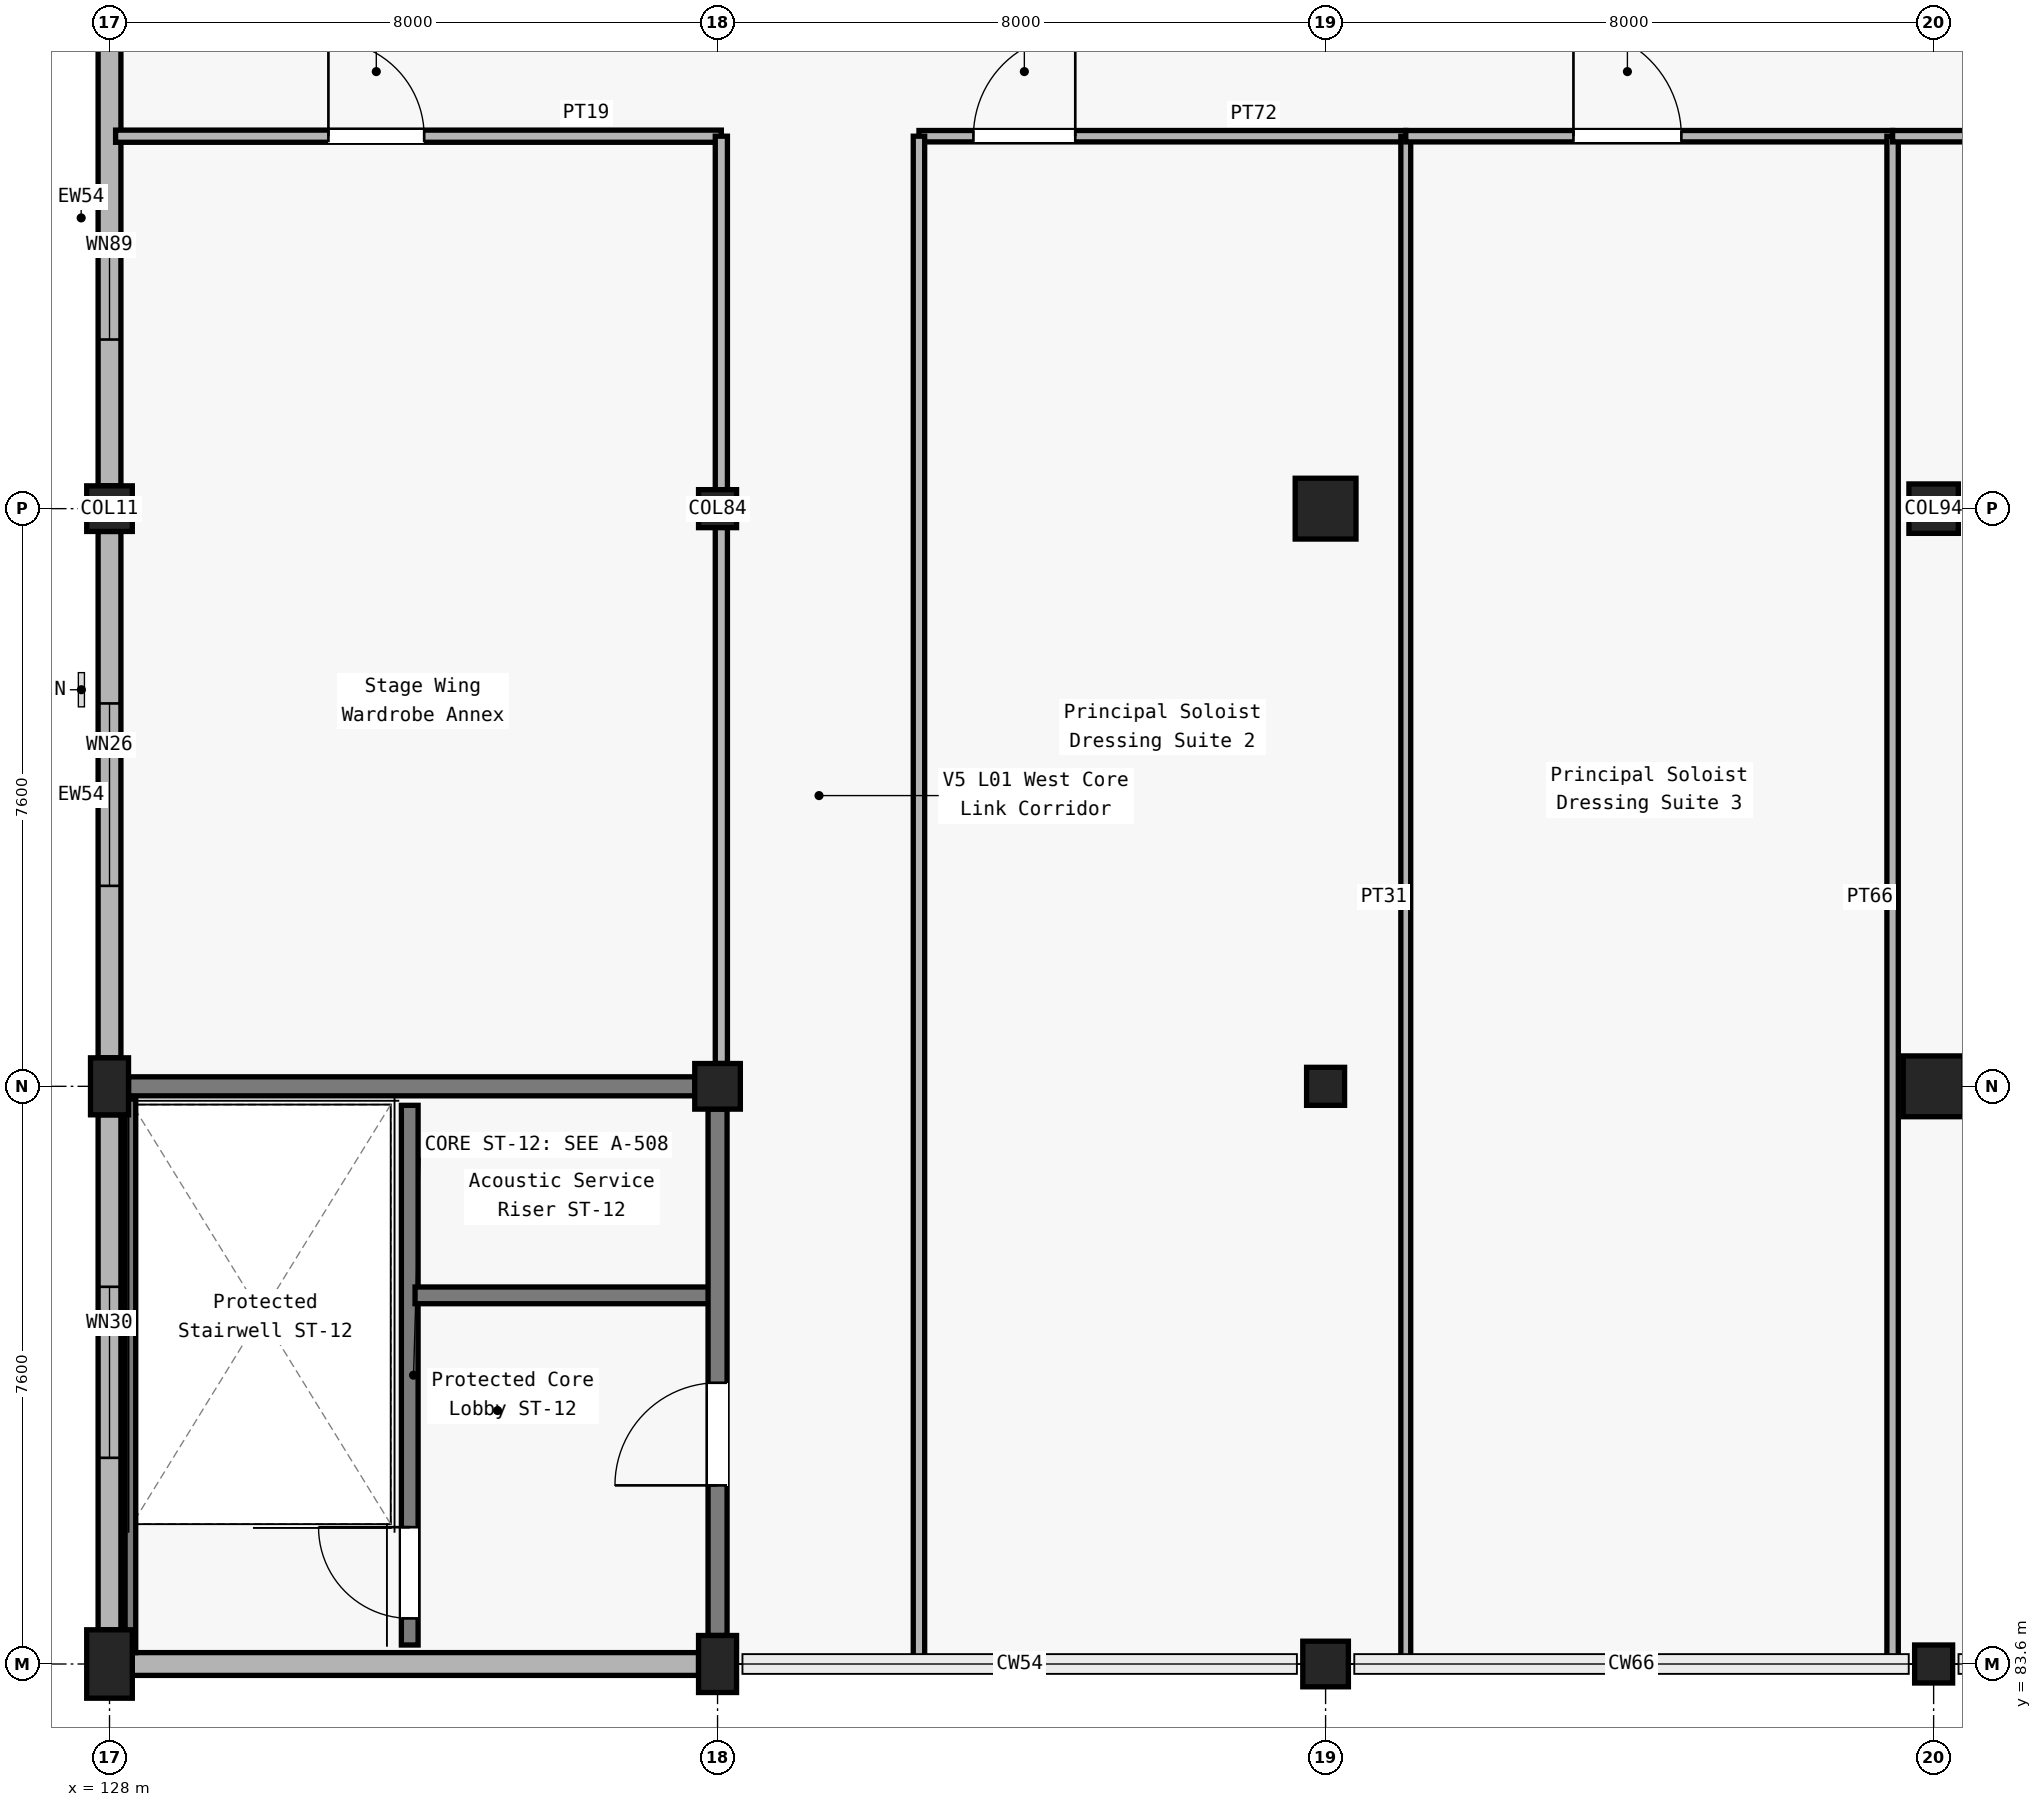
"""IFC4 building model, lengths in metres.
Left out: names, types, materials, properties, quantities, classifications, styles, units other than length and angle.
Written with IfcOpenShell. Run it as: python <this file> out.ifc"""

import sys

from ifc_helpers import new_model, si_unit, direction, frame, frame_2d, origin, origin_2d, place, context, subcontext, project, spatial, rectangle, circle, extrude, element, fill, save


model = new_model("IFC4")
c1 = context("Model", 3, precision=1e-05, world=origin(), true_north=direction((0.0, 1.0)))
c2 = subcontext(c1, "Body", "Model", "MODEL_VIEW")
j1 = project(units=[si_unit("LENGTHUNIT", "METRE"), si_unit("PLANEANGLEUNIT", "RADIAN")], contexts=[c1])
p1 = place(None, origin())
s1 = spatial("IfcSite", under=j1, at=p1, CompositionType="ELEMENT")
p2 = place(p1, origin())
s2 = spatial("IfcBuilding", under=s1, at=p2, CompositionType="ELEMENT")
p3 = place(p2, frame((0.0, 0.0, 5.4)))
s3 = spatial("IfcBuildingStorey", under=s2, at=p3, CompositionType="ELEMENT", Elevation=5.4)
p4 = place(p3, frame((128.0, 83.6, 0.0), z_axis=(0.0, 0.0, 1.0), x_axis=(1.0, 0.0, 0.0)))
e1 = element("IfcColumn", 1, at=p4, inside=s3, PredefinedType="COLUMN", context=c2, shape_type="SweptSolid", body=[
    extrude(rectangle(XDim=0.6, YDim=0.9, at=origin_2d()), origin(), (0.0, 0.0, 1.0), 4.8),
])
p5 = place(p3, frame((128.0, 91.2, 0.0), z_axis=(0.0, 0.0, 1.0), x_axis=(1.0, 0.0, 0.0)))
e2 = element("IfcColumn", 2, at=p5, inside=s3, PredefinedType="COLUMN", context=c2, shape_type="SweptSolid", body=[
    extrude(rectangle(XDim=0.5, YDim=0.75, at=origin_2d()), origin(), (0.0, 0.0, 1.0), 4.8),
])
p6 = place(p3, frame((128.0, 98.8, 0.0), z_axis=(0.0, 0.0, 1.0), x_axis=(1.0, 0.0, 0.0)))
e3 = element("IfcColumn", 3, at=p6, inside=s3, PredefinedType="COLUMN", context=c2, shape_type="SweptSolid", body=[
    extrude(rectangle(XDim=0.6, YDim=0.6, at=origin_2d()), origin(), (0.0, 0.0, 1.0), 4.8),
])
p7 = place(p3, frame((136.0, 83.6, 0.0), z_axis=(0.0, 0.0, 1.0), x_axis=(1.0, 0.0, 0.0)))
e4 = element("IfcColumn", 4, at=p7, inside=s3, PredefinedType="COLUMN", context=c2, shape_type="SweptSolid", body=[
    extrude(rectangle(XDim=0.5, YDim=0.75, at=origin_2d()), origin(), (0.0, 0.0, 1.0), 4.8),
])
p8 = place(p3, frame((136.0, 91.2, 0.0), z_axis=(0.0, 0.0, 1.0), x_axis=(1.0, 0.0, 0.0)))
e5 = element("IfcColumn", 5, at=p8, inside=s3, PredefinedType="COLUMN", context=c2, shape_type="SweptSolid", body=[
    extrude(rectangle(XDim=0.6, YDim=0.6, at=origin_2d()), origin(), (0.0, 0.0, 1.0), 4.8),
])
p9 = place(p3, frame((136.0, 98.8, 0.0), z_axis=(0.0, 0.0, 1.0), x_axis=(1.0, 0.0, 0.0)))
e6 = element("IfcColumn", 6, at=p9, inside=s3, PredefinedType="COLUMN", context=c2, shape_type="SweptSolid", body=[
    extrude(rectangle(XDim=0.5, YDim=0.5, at=origin_2d()), origin(), (0.0, 0.0, 1.0), 4.8),
])
p10 = place(p3, frame((144.0, 83.6, 0.0), z_axis=(0.0, 0.0, 1.0), x_axis=(1.0, 0.0, 0.0)))
e7 = element("IfcColumn", 7, at=p10, inside=s3, PredefinedType="COLUMN", context=c2, shape_type="SweptSolid", body=[
    extrude(rectangle(XDim=0.6, YDim=0.6, at=origin_2d()), origin(), (0.0, 0.0, 1.0), 4.8),
])
p11 = place(p3, frame((144.0, 91.2, 0.0), z_axis=(0.0, 0.0, 1.0), x_axis=(1.0, 0.0, 0.0)))
e8 = element("IfcColumn", 8, at=p11, inside=s3, PredefinedType="COLUMN", context=c2, shape_type="SweptSolid", body=[
    extrude(rectangle(XDim=0.5, YDim=0.5, at=origin_2d()), origin(), (0.0, 0.0, 1.0), 4.8),
])
p12 = place(p3, frame((144.0, 98.8, 0.0), z_axis=(0.0, 0.0, 1.0), x_axis=(1.0, 0.0, 0.0)))
e9 = element("IfcColumn", 9, at=p12, inside=s3, PredefinedType="COLUMN", context=c2, shape_type="SweptSolid", body=[
    extrude(circle(Radius=0.4, at=origin_2d()), origin(), (0.0, 0.0, 1.0), 4.8),
])
p13 = place(p3, frame((152.0, 83.6, 0.0), z_axis=(0.0, 0.0, 1.0), x_axis=(1.0, 0.0, 0.0)))
e10 = element("IfcColumn", 10, at=p13, inside=s3, PredefinedType="COLUMN", context=c2, shape_type="SweptSolid", body=[
    extrude(rectangle(XDim=0.5, YDim=0.5, at=origin_2d()), origin(), (0.0, 0.0, 1.0), 4.8),
])
p14 = place(p3, frame((152.0, 91.2, 0.0), z_axis=(0.0, 0.0, 1.0), x_axis=(1.0, 0.0, 0.0)))
e11 = element("IfcColumn", 11, at=p14, inside=s3, PredefinedType="COLUMN", context=c2, shape_type="SweptSolid", body=[
    extrude(circle(Radius=0.4, at=origin_2d()), origin(), (0.0, 0.0, 1.0), 4.8),
])
p15 = place(p3, frame((152.0, 98.8, 0.0), z_axis=(0.0, 0.0, 1.0), x_axis=(1.0, 0.0, 0.0)))
e12 = element("IfcColumn", 12, at=p15, inside=s3, PredefinedType="COLUMN", context=c2, shape_type="SweptSolid", body=[
    extrude(circle(Radius=0.325, at=origin_2d()), origin(), (0.0, 0.0, 1.0), 4.8),
])
p16 = place(p3, frame((135.75, 83.6, 0.0), z_axis=(0.0, 0.0, 1.0), x_axis=(-1.0, 0.0, 0.0)))
e13 = element("IfcWall", 13, at=p16, inside=s3, PredefinedType="SOLIDWALL", context=c2, shape_type="SweptSolid", body=[
    extrude(rectangle(XDim=7.45, YDim=0.3, at=frame_2d((3.725, 0.0))), origin(), (0.0, 0.0, 1.0), 4.2),
])
p17 = place(p3, frame((128.0, 84.05, 0.0), z_axis=(0.0, 0.0, 1.0), x_axis=(0.0, 1.0, 0.0)))
e14 = element("IfcWall", 14, at=p17, inside=s3, PredefinedType="SOLIDWALL", context=c2, shape_type="SweptSolid", body=[
    extrude(rectangle(XDim=6.775, YDim=0.3, at=frame_2d((3.387, 0.0))), origin(), (0.0, 0.0, 1.0), 4.51),
])
p18 = place(p17, frame((2.262, 0.0, 0.95)))
e15 = element("IfcOpeningElement", 15, at=p18, cuts=e14, PredefinedType="OPENING", context=c2, shape_type="SweptSolid", body=[
    extrude(rectangle(XDim=2.25, YDim=1.5, at=frame_2d((1.125, 0.75))), frame((0.0, 0.16, 0.0), z_axis=(0.0, -1.0, 0.0), x_axis=(1.0, 0.0, 0.0)), (0.0, 0.0, 1.0), 0.32),
])
p19 = place(p3, frame((128.0, 91.575, 0.0), z_axis=(0.0, 0.0, 1.0), x_axis=(0.0, 1.0, 0.0)))
e16 = element("IfcWall", 16, at=p19, inside=s3, PredefinedType="SOLIDWALL", context=c2, shape_type="SweptSolid", body=[
    extrude(rectangle(XDim=6.925, YDim=0.3, at=frame_2d((3.462, 0.0))), origin(), (0.0, 0.0, 1.0), 3.85),
])
p20 = place(p19, frame((2.262, 0.0, 0.95)))
e17 = element("IfcOpeningElement", 17, at=p20, cuts=e16, PredefinedType="OPENING", context=c2, shape_type="SweptSolid", body=[
    extrude(rectangle(XDim=2.4, YDim=1.5, at=frame_2d((1.2, 0.75))), frame((0.0, 0.16, 0.0), z_axis=(0.0, -1.0, 0.0), x_axis=(1.0, 0.0, 0.0)), (0.0, 0.0, 1.0), 0.32),
])
p21 = place(p3, frame((128.0, 99.1, 0.0), z_axis=(0.0, 0.0, 1.0), x_axis=(0.0, 1.0, 0.0)))
e18 = element("IfcWall", 18, at=p21, inside=s3, PredefinedType="SOLIDWALL", context=c2, shape_type="SweptSolid", body=[
    extrude(rectangle(XDim=7.05, YDim=0.3, at=frame_2d((3.525, 0.0))), origin(), (0.0, 0.0, 1.0), 3.85),
])
p22 = place(p21, frame((1.925, 0.0, 0.95)))
e19 = element("IfcOpeningElement", 19, at=p22, cuts=e18, PredefinedType="OPENING", context=c2, shape_type="SweptSolid", body=[
    extrude(rectangle(XDim=1.2, YDim=1.65, at=frame_2d((0.6, 0.825))), frame((0.0, 0.16, 0.0), z_axis=(0.0, -1.0, 0.0), x_axis=(1.0, 0.0, 0.0)), (0.0, 0.0, 1.0), 0.32),
])
p23 = place(p3, frame((128.25, 91.2, 0.0), z_axis=(0.0, 0.0, 1.0), x_axis=(1.0, 0.0, 0.0)))
e20 = element("IfcWall", 20, at=p23, inside=s3, PredefinedType="SOLIDWALL", context=c2, shape_type="SweptSolid", body=[
    extrude(rectangle(XDim=7.45, YDim=0.25, at=frame_2d((3.725, 0.0))), origin(), (0.0, 0.0, 1.0), 3.76),
])
p24 = place(p3, frame((131.95, 83.85, 0.0), z_axis=(0.0, 0.0, 1.0), x_axis=(0.0, 1.0, 0.0)))
e21 = element("IfcWall", 21, at=p24, inside=s3, PredefinedType="SOLIDWALL", context=c2, shape_type="SweptSolid", body=[
    extrude(rectangle(XDim=7.1, YDim=0.22, at=frame_2d((3.55, 0.0))), origin(), (0.0, 0.0, 1.0), 4.51),
])
p25 = place(p24, frame((0.35, 0.0, 0.0)))
e22 = element("IfcOpeningElement", 22, at=p25, cuts=e21, PredefinedType="OPENING", context=c2, shape_type="SweptSolid", body=[
    extrude(rectangle(XDim=1.2, YDim=2.15, at=frame_2d((0.6, 1.075))), frame((0.0, 0.12, 0.0), z_axis=(0.0, -1.0, 0.0), x_axis=(1.0, 0.0, 0.0)), (0.0, 0.0, 1.0), 0.24),
])
p26 = place(p3, frame((132.02, 88.45, 0.0), z_axis=(0.0, 0.0, 1.0), x_axis=(1.0, 0.0, 0.0)))
e23 = element("IfcWall", 23, at=p26, inside=s3, PredefinedType="SOLIDWALL", context=c2, shape_type="SweptSolid", body=[
    extrude(rectangle(XDim=3.93, YDim=0.22, at=frame_2d((1.965, 0.0))), origin(), (0.0, 0.0, 1.0), 4.51),
])
p27 = place(p3, frame((136.0, 83.975, 0.0), z_axis=(0.0, 0.0, 1.0), x_axis=(0.0, 1.0, 0.0)))
e24 = element("IfcWall", 24, at=p27, inside=s3, PredefinedType="SOLIDWALL", context=c2, shape_type="SweptSolid", body=[
    extrude(rectangle(XDim=6.925, YDim=0.25, at=frame_2d((3.462, 0.0))), origin(), (0.0, 0.0, 1.0), 3.76),
])
p28 = place(p27, frame((1.975, 0.0, 0.0)))
e25 = element("IfcOpeningElement", 25, at=p28, cuts=e24, PredefinedType="OPENING", context=c2, shape_type="SweptSolid", body=[
    extrude(rectangle(XDim=1.35, YDim=2.2, at=frame_2d((0.675, 1.1))), frame((0.0, 0.135, 0.0), z_axis=(0.0, -1.0, 0.0), x_axis=(1.0, 0.0, 0.0)), (0.0, 0.0, 1.0), 0.27),
])
p29 = place(p3, frame((128.08, 103.7, 0.0), z_axis=(0.0, 0.0, 1.0), x_axis=(1.0, 0.0, 0.0)))
e26 = element("IfcWall", 26, at=p29, inside=s3, PredefinedType="PARTITIONING", context=c2, shape_type="SweptSolid", body=[
    extrude(rectangle(XDim=7.97, YDim=0.16, at=frame_2d((3.985, 0.0))), origin(), (0.0, 0.0, 1.0), 3.735),
])
p30 = place(p29, frame((2.8, 0.0, 0.0)))
e27 = element("IfcOpeningElement", 27, at=p30, cuts=e26, PredefinedType="OPENING", context=c2, shape_type="SweptSolid", body=[
    extrude(rectangle(XDim=1.26, YDim=2.2, at=frame_2d((0.63, 1.1))), frame((0.0, 0.09, 0.0), z_axis=(0.0, -1.0, 0.0), x_axis=(1.0, 0.0, 0.0)), (0.0, 0.0, 1.0), 0.18),
])
p31 = place(p3, frame((136.05, 91.5, 0.0), z_axis=(0.0, 0.0, 1.0), x_axis=(0.0, 1.0, 0.0)))
e28 = element("IfcWall", 28, at=p31, inside=s3, PredefinedType="PARTITIONING", context=c2, shape_type="SweptSolid", body=[
    extrude(rectangle(XDim=12.2, YDim=0.16, at=frame_2d((6.1, 0.0))), origin(), (0.0, 0.0, 1.0), 3.735),
])
p32 = place(p3, frame((138.65, 103.7, 0.0), z_axis=(0.0, 0.0, 1.0), x_axis=(1.0, 0.0, 0.0)))
e29 = element("IfcWall", 29, at=p32, inside=s3, PredefinedType="PARTITIONING", context=c2, shape_type="SweptSolid", body=[
    extrude(rectangle(XDim=6.405, YDim=0.15, at=frame_2d((3.203, 0.0))), origin(), (0.0, 0.0, 1.0), 3.735),
])
p33 = place(p32, frame((0.717, 0.0, 0.0)))
e30 = element("IfcOpeningElement", 30, at=p33, cuts=e29, PredefinedType="OPENING", context=c2, shape_type="SweptSolid", body=[
    extrude(rectangle(XDim=1.34, YDim=2.2, at=frame_2d((0.67, 1.1))), frame((0.0, 0.085, 0.0), z_axis=(0.0, -1.0, 0.0), x_axis=(1.0, 0.0, 0.0)), (0.0, 0.0, 1.0), 0.17),
])
p34 = place(p3, frame((145.055, 83.68, 0.0), z_axis=(0.0, 0.0, 1.0), x_axis=(0.0, 1.0, 0.0)))
e31 = element("IfcWall", 31, at=p34, inside=s3, PredefinedType="PARTITIONING", context=c2, shape_type="SweptSolid", body=[
    extrude(rectangle(XDim=20.02, YDim=0.13, at=frame_2d((10.01, 0.0))), origin(), (0.0, 0.0, 1.0), 3.55),
])
p35 = place(p3, frame((145.055, 103.7, 0.0), z_axis=(0.0, 0.0, 1.0), x_axis=(1.0, 0.0, 0.0)))
e32 = element("IfcWall", 32, at=p35, inside=s3, PredefinedType="PARTITIONING", context=c2, shape_type="SweptSolid", body=[
    extrude(rectangle(XDim=6.405, YDim=0.15, at=frame_2d((3.203, 0.0))), origin(), (0.0, 0.0, 1.0), 3.895),
])
p36 = place(p35, frame((2.206, 0.0, 0.0)))
e33 = element("IfcOpeningElement", 33, at=p36, cuts=e32, PredefinedType="OPENING", context=c2, shape_type="SweptSolid", body=[
    extrude(rectangle(XDim=1.42, YDim=2.2, at=frame_2d((0.71, 1.1))), frame((0.0, 0.085, 0.0), z_axis=(0.0, -1.0, 0.0), x_axis=(1.0, 0.0, 0.0)), (0.0, 0.0, 1.0), 0.17),
])
p37 = place(p3, frame((151.46, 83.68, 0.0), z_axis=(0.0, 0.0, 1.0), x_axis=(0.0, 1.0, 0.0)))
e34 = element("IfcWall", 34, at=p37, inside=s3, PredefinedType="PARTITIONING", context=c2, shape_type="SweptSolid", body=[
    extrude(rectangle(XDim=20.02, YDim=0.15, at=frame_2d((10.01, 0.0))), origin(), (0.0, 0.0, 1.0), 3.55),
])
p38 = place(p3, frame((151.46, 103.7, 0.0), z_axis=(0.0, 0.0, 1.0), x_axis=(1.0, 0.0, 0.0)))
e35 = element("IfcWall", 35, at=p38, inside=s3, PredefinedType="PARTITIONING", context=c2, shape_type="SweptSolid", body=[
    extrude(rectangle(XDim=8.54, YDim=0.15, at=frame_2d((4.27, 0.0))), origin(), (0.0, 0.0, 1.0), 3.685),
])
p39 = place(p38, frame((3.77, 0.0, 0.0)))
e36 = element("IfcOpeningElement", 36, at=p39, cuts=e35, PredefinedType="OPENING", context=c2, shape_type="SweptSolid", body=[
    extrude(rectangle(XDim=0.92, YDim=2.05, at=frame_2d((0.46, 1.025))), frame((0.0, 0.085, 0.0), z_axis=(0.0, -1.0, 0.0), x_axis=(1.0, 0.0, 0.0)), (0.0, 0.0, 1.0), 0.17),
])
p40 = place(p3, frame((138.65, 83.68, 0.0), z_axis=(0.0, 0.0, 1.0), x_axis=(0.0, 1.0, 0.0)))
e37 = element("IfcWall", 37, at=p40, inside=s3, PredefinedType="PARTITIONING", context=c2, shape_type="SweptSolid", body=[
    extrude(rectangle(XDim=20.02, YDim=0.15, at=frame_2d((10.01, 0.0))), origin(), (0.0, 0.0, 1.0), 3.735),
])
p41 = place(p3, frame((128.275, 83.75, 0.0), z_axis=(0.0, 0.0, 1.0), x_axis=(0.0, 1.0, 0.0)))
e38 = element("IfcWall", 38, at=p41, inside=s3, PredefinedType="SOLIDWALL", context=c2, shape_type="SweptSolid", body=[
    extrude(rectangle(XDim=7.3, YDim=0.14, at=frame_2d((3.65, 0.0))), origin(), (0.0, 0.0, 1.0), 4.51),
])
p42 = place(p18, origin())
e39 = element("IfcWindow", 39, at=p42, inside=s3, PartitioningType="DOUBLE_PANEL_VERTICAL", PredefinedType="WINDOW", context=c2, shape_type="SweptSolid", body=[
    extrude(rectangle(XDim=2.25, YDim=1.5, at=frame_2d((1.125, 0.75))), frame((0.0, 0.03, 0.0), z_axis=(0.0, -1.0, 0.0), x_axis=(1.0, 0.0, 0.0)), (0.0, 0.0, 1.0), 0.06),
])
fill(e15, e39)
p43 = place(p20, origin())
e40 = element("IfcWindow", 40, at=p43, inside=s3, PartitioningType="DOUBLE_PANEL_VERTICAL", PredefinedType="WINDOW", context=c2, shape_type="SweptSolid", body=[
    extrude(rectangle(XDim=2.4, YDim=1.5, at=frame_2d((1.2, 0.75))), frame((0.0, 0.03, 0.0), z_axis=(0.0, -1.0, 0.0), x_axis=(1.0, 0.0, 0.0)), (0.0, 0.0, 1.0), 0.06),
])
fill(e17, e40)
p44 = place(p22, origin())
e41 = element("IfcWindow", 41, at=p44, inside=s3, PartitioningType="SINGLE_PANEL", PredefinedType="WINDOW", context=c2, shape_type="SweptSolid", body=[
    extrude(rectangle(XDim=1.2, YDim=1.65, at=frame_2d((0.6, 0.825))), frame((0.0, 0.03, 0.0), z_axis=(0.0, -1.0, 0.0), x_axis=(1.0, 0.0, 0.0)), (0.0, 0.0, 1.0), 0.06),
])
fill(e19, e41)
p45 = place(p25, origin())
e42 = element("IfcDoor", 42, at=p45, inside=s3, OperationType="SINGLE_SWING_RIGHT", PredefinedType="DOOR", context=c2, shape_type="SweptSolid", body=[
    extrude(rectangle(XDim=1.2, YDim=2.15, at=frame_2d((0.6, 1.075))), frame((0.0, 0.025, 0.0), z_axis=(0.0, -1.0, 0.0), x_axis=(1.0, 0.0, 0.0)), (0.0, 0.0, 1.0), 0.05),
])
fill(e22, e42)
p46 = place(p28, origin())
e43 = element("IfcDoor", 43, at=p46, inside=s3, OperationType="SINGLE_SWING_LEFT", PredefinedType="DOOR", context=c2, shape_type="SweptSolid", body=[
    extrude(rectangle(XDim=1.35, YDim=2.2, at=frame_2d((0.675, 1.1))), frame((0.0, 0.025, 0.0), z_axis=(0.0, -1.0, 0.0), x_axis=(1.0, 0.0, 0.0)), (0.0, 0.0, 1.0), 0.05),
])
fill(e25, e43)
p47 = place(p30, origin())
e44 = element("IfcDoor", 44, at=p47, inside=s3, OperationType="SINGLE_SWING_LEFT", PredefinedType="DOOR", context=c2, shape_type="SweptSolid", body=[
    extrude(rectangle(XDim=1.26, YDim=2.2, at=frame_2d((0.63, 1.1))), frame((0.0, 0.025, 0.0), z_axis=(0.0, -1.0, 0.0), x_axis=(1.0, 0.0, 0.0)), (0.0, 0.0, 1.0), 0.05),
])
fill(e27, e44)
p48 = place(p33, origin())
e45 = element("IfcDoor", 45, at=p48, inside=s3, OperationType="SINGLE_SWING_RIGHT", PredefinedType="DOOR", context=c2, shape_type="SweptSolid", body=[
    extrude(rectangle(XDim=1.34, YDim=2.2, at=frame_2d((0.67, 1.1))), frame((0.0, 0.025, 0.0), z_axis=(0.0, -1.0, 0.0), x_axis=(1.0, 0.0, 0.0)), (0.0, 0.0, 1.0), 0.05),
])
fill(e30, e45)
p49 = place(p36, origin())
e46 = element("IfcDoor", 46, at=p49, inside=s3, OperationType="SINGLE_SWING_LEFT", PredefinedType="DOOR", context=c2, shape_type="SweptSolid", body=[
    extrude(rectangle(XDim=1.42, YDim=2.2, at=frame_2d((0.71, 1.1))), frame((0.0, 0.025, 0.0), z_axis=(0.0, -1.0, 0.0), x_axis=(1.0, 0.0, 0.0)), (0.0, 0.0, 1.0), 0.05),
])
fill(e33, e46)
save(model, sys.argv[1])
